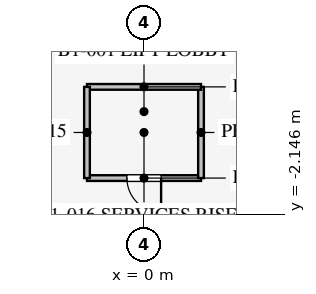
"""IFC4 building model, lengths in metres.
Left out: names, types, materials, properties, quantities, classifications, styles, units other than length and angle.
Written with IfcOpenShell. Run it as: python <this file> out.ifc"""

import sys

from ifc_helpers import new_model, si_unit, direction, frame, frame_2d, origin, place, context, subcontext, project, spatial, rectangle, extrude, element, fill, save


model = new_model("IFC4")
c1 = context("Model", 3, precision=1e-05, world=origin(), true_north=direction((0.0, 1.0)))
c2 = subcontext(c1, "Body", "Model", "MODEL_VIEW")
j1 = project(units=[si_unit("LENGTHUNIT", "METRE"), si_unit("PLANEANGLEUNIT", "RADIAN")], contexts=[c1])
p1 = place(None, origin())
s1 = spatial("IfcSite", under=j1, at=p1, CompositionType="ELEMENT")
p2 = place(p1, origin())
s2 = spatial("IfcBuilding", under=s1, at=p2, CompositionType="ELEMENT")
p3 = place(p2, frame((0.0, 0.0, -6.0)))
s3 = spatial("IfcBuildingStorey", under=s2, at=p3, CompositionType="ELEMENT", Elevation=-6.0)
p4 = place(p3, frame((-1.5, -1.2, 0.0), z_axis=(0.0, 0.0, 1.0), x_axis=(1.0, 0.0, 0.0)))
e1 = element("IfcWall", 1, at=p4, inside=s3, PredefinedType="PARTITIONING", context=c2, shape_type="SweptSolid", body=[
    extrude(rectangle(XDim=3.0, YDim=0.15, at=frame_2d((1.5, 0.0))), origin(), (0.0, 0.0, 1.0), 5.7),
])
p5 = place(p4, frame((1.05, 0.0, 0.0)))
e2 = element("IfcOpeningElement", 2, at=p5, cuts=e1, PredefinedType="OPENING", context=c2, shape_type="SweptSolid", body=[
    extrude(rectangle(XDim=0.9, YDim=2.1, at=frame_2d((0.45, 1.05))), frame((0.0, 0.085, 0.0), z_axis=(0.0, -1.0, 0.0), x_axis=(1.0, 0.0, 0.0)), (0.0, 0.0, 1.0), 0.17),
])
p6 = place(p3, frame((1.5, -1.2, 0.0), z_axis=(0.0, 0.0, 1.0), x_axis=(0.0, 1.0, 0.0)))
e3 = element("IfcWall", 3, at=p6, inside=s3, PredefinedType="PARTITIONING", context=c2, shape_type="SweptSolid", body=[
    extrude(rectangle(XDim=2.4, YDim=0.15, at=frame_2d((1.2, 0.0))), origin(), (0.0, 0.0, 1.0), 5.7),
])
p7 = place(p3, frame((1.5, 1.2, 0.0), z_axis=(0.0, 0.0, 1.0), x_axis=(-1.0, 0.0, 0.0)))
e4 = element("IfcWall", 4, at=p7, inside=s3, PredefinedType="PARTITIONING", context=c2, shape_type="SweptSolid", body=[
    extrude(rectangle(XDim=3.0, YDim=0.15, at=frame_2d((1.5, 0.0))), origin(), (0.0, 0.0, 1.0), 5.7),
])
p8 = place(p3, frame((-1.5, 1.2, 0.0), z_axis=(0.0, 0.0, 1.0), x_axis=(0.0, -1.0, 0.0)))
e5 = element("IfcWall", 5, at=p8, inside=s3, PredefinedType="PARTITIONING", context=c2, shape_type="SweptSolid", body=[
    extrude(rectangle(XDim=2.4, YDim=0.15, at=frame_2d((1.2, 0.0))), origin(), (0.0, 0.0, 1.0), 5.7),
])
p9 = place(p5, frame((0.9, 0.0, 0.0), z_axis=(0.0, 0.0, 1.0), x_axis=(-1.0, 0.0, 0.0)))
e6 = element("IfcDoor", 6, at=p9, inside=s3, OperationType="SINGLE_SWING_LEFT", PredefinedType="DOOR", context=c2, shape_type="SweptSolid", body=[
    extrude(rectangle(XDim=0.9, YDim=2.1, at=frame_2d((0.45, 1.05))), frame((0.0, 0.025, 0.0), z_axis=(0.0, -1.0, 0.0), x_axis=(1.0, 0.0, 0.0)), (0.0, 0.0, 1.0), 0.05),
])
fill(e2, e6)
save(model, sys.argv[1])
